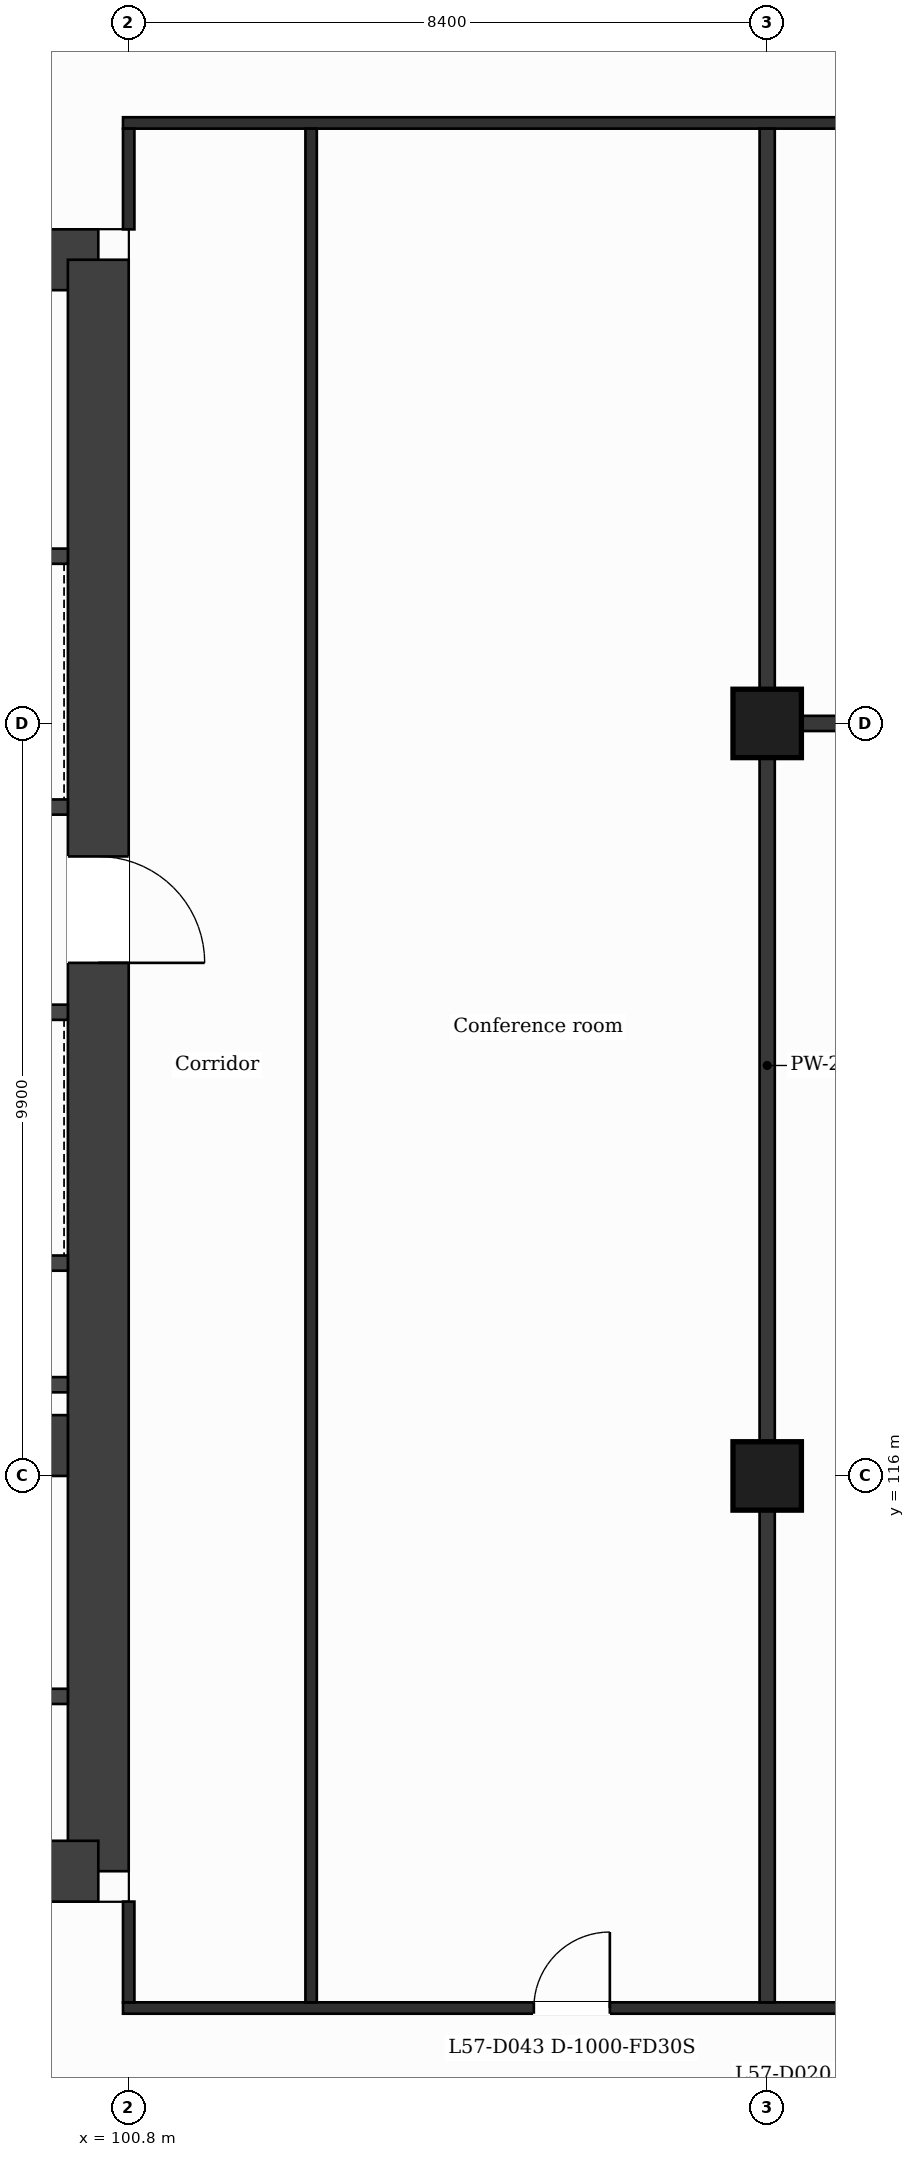
"""IFC4 building model, lengths in metres.
Left out: names, types, materials, properties, quantities, classifications, styles, units other than length and angle.
Written with IfcOpenShell. Run it as: python <this file> out.ifc"""

import sys

from ifc_helpers import new_model, si_unit, direction, frame, frame_2d, origin, origin_2d, place, context, subcontext, project, spatial, rectangle, extrude, element, fill, save


model = new_model("IFC4")
c1 = context("Model", 3, precision=1e-05, world=origin(), true_north=direction((0.0, 1.0)))
c2 = subcontext(c1, "Body", "Model", "MODEL_VIEW")
j1 = project(units=[si_unit("LENGTHUNIT", "METRE"), si_unit("PLANEANGLEUNIT", "RADIAN")], contexts=[c1])
p1 = place(None, origin())
s1 = spatial("IfcSite", under=j1, at=p1, CompositionType="ELEMENT")
p2 = place(p1, origin())
s2 = spatial("IfcBuilding", under=s1, at=p2, CompositionType="ELEMENT")
p3 = place(p2, frame((0.0, 0.0, 235.5)))
s3 = spatial("IfcBuildingStorey", under=s2, at=p3, CompositionType="ELEMENT", Elevation=235.5)
p4 = place(p3, frame((88.98, 132.0, 0.0), z_axis=(0.0, 0.0, 1.0), x_axis=(1.0, 0.0, 0.0)))
e1 = element("IfcWall", 1, at=p4, inside=s3, PredefinedType="SHEAR", context=c2, shape_type="SweptSolid", body=[
    extrude(rectangle(XDim=11.419, YDim=0.8, at=frame_2d((5.71, 0.0))), origin(), (0.0, 0.0, 1.0), 3.7),
])
p5 = place(p4, frame((6.833, 0.0, 0.0)))
e2 = element("IfcOpeningElement", 2, at=p5, cuts=e1, PredefinedType="OPENING", context=c2, shape_type="SweptSolid", body=[
    extrude(rectangle(XDim=1.2, YDim=2.1, at=frame_2d((0.6, 1.05))), frame((0.0, 0.41, 0.0), z_axis=(0.0, -1.0, 0.0), x_axis=(1.0, 0.0, 0.0)), (0.0, 0.0, 1.0), 0.82),
])
p6 = place(p3, frame((100.4, 132.0, 0.0), z_axis=(0.0, 0.0, 1.0), x_axis=(0.0, -1.0, 0.0)))
e3 = element("IfcWall", 3, at=p6, inside=s3, PredefinedType="SHEAR", context=c2, shape_type="SweptSolid", body=[
    extrude(rectangle(XDim=21.2, YDim=0.8, at=frame_2d((10.6, 0.0))), origin(), (0.0, 0.0, 1.0), 3.7),
])
p7 = place(p6, frame((7.85, 0.0, 0.0)))
e4 = element("IfcOpeningElement", 4, at=p7, cuts=e3, PredefinedType="OPENING", context=c2, shape_type="SweptSolid", body=[
    extrude(rectangle(XDim=1.4, YDim=2.1, at=frame_2d((0.7, 1.05))), frame((0.0, 0.41, 0.0), z_axis=(0.0, -1.0, 0.0), x_axis=(1.0, 0.0, 0.0)), (0.0, 0.0, 1.0), 0.82),
])
p8 = place(p3, frame((100.4, 110.8, 0.0), z_axis=(0.0, 0.0, 1.0), x_axis=(-1.0, 0.0, 0.0)))
e5 = element("IfcWall", 5, at=p8, inside=s3, PredefinedType="SHEAR", context=c2, shape_type="SweptSolid", body=[
    extrude(rectangle(XDim=14.273, YDim=0.8, at=frame_2d((7.137, 0.0))), origin(), (0.0, 0.0, 1.0), 3.7),
])
p9 = place(p8, frame((5.908, 0.0, 0.0)))
e6 = element("IfcOpeningElement", 6, at=p9, cuts=e5, PredefinedType="OPENING", context=c2, shape_type="SweptSolid", body=[
    extrude(rectangle(XDim=1.4, YDim=2.1, at=frame_2d((0.7, 1.05))), frame((0.0, 0.41, 0.0), z_axis=(0.0, -1.0, 0.0), x_axis=(1.0, 0.0, 0.0)), (0.0, 0.0, 1.0), 0.82),
])
p10 = place(p3, frame((94.7, 116.4, 0.0), z_axis=(0.0, 0.0, 1.0), x_axis=(1.0, 0.0, 0.0)))
e7 = element("IfcWall", 7, at=p10, inside=s3, PredefinedType="SHEAR", context=c2, shape_type="SweptSolid", body=[
    extrude(rectangle(XDim=5.3, YDim=0.8, at=frame_2d((2.65, 0.0))), origin(), (0.0, 0.0, 1.0), 3.7),
])
for number, where, z_axis, x_axis in (
    (8, (109.2, 116.0, 0.0), (0.0, 0.0, 1.0), (1.0, 0.0, 0.0)),
    (9, (109.2, 125.9, 0.0), (0.0, 0.0, 1.0), (1.0, 0.0, 0.0)),
):
    element("IfcColumn", number, at=place(p3, frame(where, z_axis=z_axis, x_axis=x_axis)), inside=s3, PredefinedType="COLUMN", context=c2, shape_type="SweptSolid", body=[
        extrude(rectangle(XDim=0.9, YDim=0.9, at=origin_2d()), origin(), (0.0, 0.0, 1.0), 3.7),
    ])
p11 = place(p3, frame((100.725, 109.0, 0.0), z_axis=(0.0, 0.0, 1.0), x_axis=(1.0, 0.0, 0.0)))
e10 = element("IfcWall", 10, at=p11, inside=s3, PredefinedType="PARTITIONING", context=c2, shape_type="SweptSolid", body=[
    extrude(rectangle(XDim=25.35, YDim=0.15, at=frame_2d((12.675, 0.0))), origin(), (0.0, 0.0, 1.0), 3.38),
])
p12 = place(p11, frame((5.405, 0.0, 0.0)))
e11 = element("IfcOpeningElement", 11, at=p12, cuts=e10, PredefinedType="OPENING", context=c2, shape_type="SweptSolid", body=[
    extrude(rectangle(XDim=1.0, YDim=2.1, at=frame_2d((0.5, 1.05))), frame((0.0, 0.085, 0.0), z_axis=(0.0, -1.0, 0.0), x_axis=(1.0, 0.0, 0.0)), (0.0, 0.0, 1.0), 0.17),
])
p13 = place(p11, frame((12.845, 0.0, 0.0)))
e12 = element("IfcOpeningElement", 12, at=p13, cuts=e10, PredefinedType="OPENING", context=c2, shape_type="SweptSolid", body=[
    extrude(rectangle(XDim=1.0, YDim=2.1, at=frame_2d((0.5, 1.05))), frame((0.0, 0.085, 0.0), z_axis=(0.0, -1.0, 0.0), x_axis=(1.0, 0.0, 0.0)), (0.0, 0.0, 1.0), 0.17),
])
p14 = place(p11, frame((19.805, 0.0, 0.0)))
e13 = element("IfcOpeningElement", 13, at=p14, cuts=e10, PredefinedType="OPENING", context=c2, shape_type="SweptSolid", body=[
    extrude(rectangle(XDim=1.0, YDim=2.1, at=frame_2d((0.5, 1.05))), frame((0.0, 0.085, 0.0), z_axis=(0.0, -1.0, 0.0), x_axis=(1.0, 0.0, 0.0)), (0.0, 0.0, 1.0), 0.17),
])
p15 = place(p3, frame((95.127, 113.1, 0.0), z_axis=(0.0, 0.0, 1.0), x_axis=(1.0, 0.0, 0.0)))
e14 = element("IfcWall", 14, at=p15, inside=s3, PredefinedType="PARTITIONING", context=c2, shape_type="SweptSolid", body=[
    extrude(rectangle(XDim=4.873, YDim=0.2, at=frame_2d((2.437, 0.0))), origin(), (0.0, 0.0, 1.0), 3.38),
])
p16 = place(p15, frame((1.243, 0.0, 0.0)))
e15 = element("IfcOpeningElement", 15, at=p16, cuts=e14, PredefinedType="OPENING", context=c2, shape_type="SweptSolid", body=[
    extrude(rectangle(XDim=0.9, YDim=2.1, at=frame_2d((0.45, 1.05))), frame((0.0, 0.11, 0.0), z_axis=(0.0, -1.0, 0.0), x_axis=(1.0, 0.0, 0.0)), (0.0, 0.0, 1.0), 0.22),
])
for number, where, z_axis, x_axis in (
    (16, (95.227, 117.2, 0.0), (0.0, 0.0, 1.0), (1.0, 0.0, 0.0)),
    (17, (95.227, 118.8, 0.0), (0.0, 0.0, 1.0), (1.0, 0.0, 0.0)),
):
    element("IfcWall", number, at=place(p3, frame(where, z_axis=z_axis, x_axis=x_axis)), inside=s3, PredefinedType="PARTITIONING", context=c2, shape_type="SweptSolid", body=[
        extrude(rectangle(XDim=4.773, YDim=0.2, at=frame_2d((2.386, 0.0))), origin(), (0.0, 0.0, 1.0), 3.38),
    ])
p17 = place(p3, frame((95.227, 122.1, 0.0), z_axis=(0.0, 0.0, 1.0), x_axis=(1.0, 0.0, 0.0)))
e18 = element("IfcWall", 18, at=p17, inside=s3, PredefinedType="PARTITIONING", context=c2, shape_type="SweptSolid", body=[
    extrude(rectangle(XDim=4.773, YDim=0.2, at=frame_2d((2.386, 0.0))), origin(), (0.0, 0.0, 1.0), 3.38),
])
p18 = place(p17, frame((0.79, 0.0, 0.0)))
e19 = element("IfcOpeningElement", 19, at=p18, cuts=e18, PredefinedType="OPENING", context=c2, shape_type="SweptSolid", body=[
    extrude(rectangle(XDim=1.1, YDim=2.1, at=frame_2d((0.55, 1.05))), frame((0.0, 0.11, 0.0), z_axis=(0.0, -1.0, 0.0), x_axis=(1.0, 0.0, 0.0)), (0.0, 0.0, 1.0), 0.22),
])
p19 = place(p17, frame((3.088, 0.0, 0.0)))
e20 = element("IfcOpeningElement", 20, at=p19, cuts=e18, PredefinedType="OPENING", context=c2, shape_type="SweptSolid", body=[
    extrude(rectangle(XDim=1.1, YDim=2.1, at=frame_2d((0.55, 1.05))), frame((0.0, 0.11, 0.0), z_axis=(0.0, -1.0, 0.0), x_axis=(1.0, 0.0, 0.0)), (0.0, 0.0, 1.0), 0.22),
])
p20 = place(p3, frame((92.702, 124.8, 0.0), z_axis=(0.0, 0.0, 1.0), x_axis=(1.0, 0.0, 0.0)))
e21 = element("IfcWall", 21, at=p20, inside=s3, PredefinedType="PARTITIONING", context=c2, shape_type="SweptSolid", body=[
    extrude(rectangle(XDim=7.298, YDim=0.2, at=frame_2d((3.649, 0.0))), origin(), (0.0, 0.0, 1.0), 3.38),
])
p21 = place(p20, frame((5.552, 0.0, 0.0)))
e22 = element("IfcOpeningElement", 22, at=p21, cuts=e21, PredefinedType="OPENING", context=c2, shape_type="SweptSolid", body=[
    extrude(rectangle(XDim=1.1, YDim=2.1, at=frame_2d((0.55, 1.05))), frame((0.0, 0.11, 0.0), z_axis=(0.0, -1.0, 0.0), x_axis=(1.0, 0.0, 0.0)), (0.0, 0.0, 1.0), 0.22),
])
p22 = place(p3, frame((109.2, 125.9, 0.0), z_axis=(0.0, 0.0, 1.0), x_axis=(1.0, 0.0, 0.0)))
e23 = element("IfcWall", 23, at=p22, inside=s3, PredefinedType="PARTITIONING", context=c2, shape_type="SweptSolid", body=[
    extrude(rectangle(XDim=8.4, YDim=0.2, at=frame_2d((4.2, 0.0))), origin(), (0.0, 0.0, 1.0), 3.38),
])
p23 = place(p3, frame((92.827, 128.1, 0.0), z_axis=(0.0, 0.0, 1.0), x_axis=(1.0, 0.0, 0.0)))
e24 = element("IfcWall", 24, at=p23, inside=s3, PredefinedType="PARTITIONING", context=c2, shape_type="SweptSolid", body=[
    extrude(rectangle(XDim=7.173, YDim=0.2, at=frame_2d((3.586, 0.0))), origin(), (0.0, 0.0, 1.0), 3.38),
])
p24 = place(p23, frame((2.889, 0.0, 0.0)))
e25 = element("IfcOpeningElement", 25, at=p24, cuts=e24, PredefinedType="OPENING", context=c2, shape_type="SweptSolid", body=[
    extrude(rectangle(XDim=1.1, YDim=2.1, at=frame_2d((0.55, 1.05))), frame((0.0, 0.11, 0.0), z_axis=(0.0, -1.0, 0.0), x_axis=(1.0, 0.0, 0.0)), (0.0, 0.0, 1.0), 0.22),
])
p25 = place(p3, frame((100.725, 133.8, 0.0), z_axis=(0.0, 0.0, 1.0), x_axis=(1.0, 0.0, 0.0)))
e26 = element("IfcWall", 26, at=p25, inside=s3, PredefinedType="PARTITIONING", context=c2, shape_type="SweptSolid", body=[
    extrude(rectangle(XDim=25.35, YDim=0.15, at=frame_2d((12.675, 0.0))), origin(), (0.0, 0.0, 1.0), 3.38),
])
p26 = place(p25, frame((12.845, 0.0, 0.0)))
e27 = element("IfcOpeningElement", 27, at=p26, cuts=e26, PredefinedType="OPENING", context=c2, shape_type="SweptSolid", body=[
    extrude(rectangle(XDim=1.0, YDim=2.1, at=frame_2d((0.5, 1.05))), frame((0.0, 0.085, 0.0), z_axis=(0.0, -1.0, 0.0), x_axis=(1.0, 0.0, 0.0)), (0.0, 0.0, 1.0), 0.17),
])
p27 = place(p3, frame((100.8, 109.075, 0.0), z_axis=(0.0, 0.0, 1.0), x_axis=(0.0, 1.0, 0.0)))
e28 = element("IfcWall", 28, at=p27, inside=s3, PredefinedType="PARTITIONING", context=c2, shape_type="SweptSolid", body=[
    extrude(rectangle(XDim=1.325, YDim=0.15, at=frame_2d((0.663, 0.0))), origin(), (0.0, 0.0, 1.0), 3.38),
])
p28 = place(p3, frame((100.8, 132.4, 0.0), z_axis=(0.0, 0.0, 1.0), x_axis=(0.0, 1.0, 0.0)))
e29 = element("IfcWall", 29, at=p28, inside=s3, PredefinedType="PARTITIONING", context=c2, shape_type="SweptSolid", body=[
    extrude(rectangle(XDim=1.325, YDim=0.15, at=frame_2d((0.663, 0.0))), origin(), (0.0, 0.0, 1.0), 3.38),
])
p29 = place(p3, frame((103.2, 109.075, 0.0), z_axis=(0.0, 0.0, 1.0), x_axis=(0.0, 1.0, 0.0)))
e30 = element("IfcWall", 30, at=p29, inside=s3, PredefinedType="PARTITIONING", context=c2, shape_type="SweptSolid", body=[
    extrude(rectangle(XDim=24.65, YDim=0.15, at=frame_2d((12.325, 0.0))), origin(), (0.0, 0.0, 1.0), 3.38),
])
p30 = place(p3, frame((109.2, 109.075, 0.0), z_axis=(0.0, 0.0, 1.0), x_axis=(0.0, 1.0, 0.0)))
e31 = element("IfcWall", 31, at=p30, inside=s3, PredefinedType="PARTITIONING", context=c2, shape_type="SweptSolid", body=[
    extrude(rectangle(XDim=24.65, YDim=0.2, at=frame_2d((12.325, 0.0))), origin(), (0.0, 0.0, 1.0), 3.38),
])
p31 = place(p12, origin())
e32 = element("IfcDoor", 32, at=p31, inside=s3, OperationType="SINGLE_SWING_RIGHT", PredefinedType="DOOR", context=c2, shape_type="SweptSolid", body=[
    extrude(rectangle(XDim=1.0, YDim=2.1, at=frame_2d((0.5, 1.05))), frame((0.0, 0.025, 0.0), z_axis=(0.0, -1.0, 0.0), x_axis=(1.0, 0.0, 0.0)), (0.0, 0.0, 1.0), 0.05),
])
fill(e11, e32)
p32 = place(p7, origin())
e33 = element("IfcDoor", 33, at=p32, inside=s3, OperationType="SINGLE_SWING_RIGHT", PredefinedType="DOOR", context=c2, shape_type="SweptSolid", body=[
    extrude(rectangle(XDim=1.4, YDim=2.1, at=frame_2d((0.7, 1.05))), frame((0.0, 0.025, 0.0), z_axis=(0.0, -1.0, 0.0), x_axis=(1.0, 0.0, 0.0)), (0.0, 0.0, 1.0), 0.05),
])
fill(e4, e33)
save(model, sys.argv[1])
